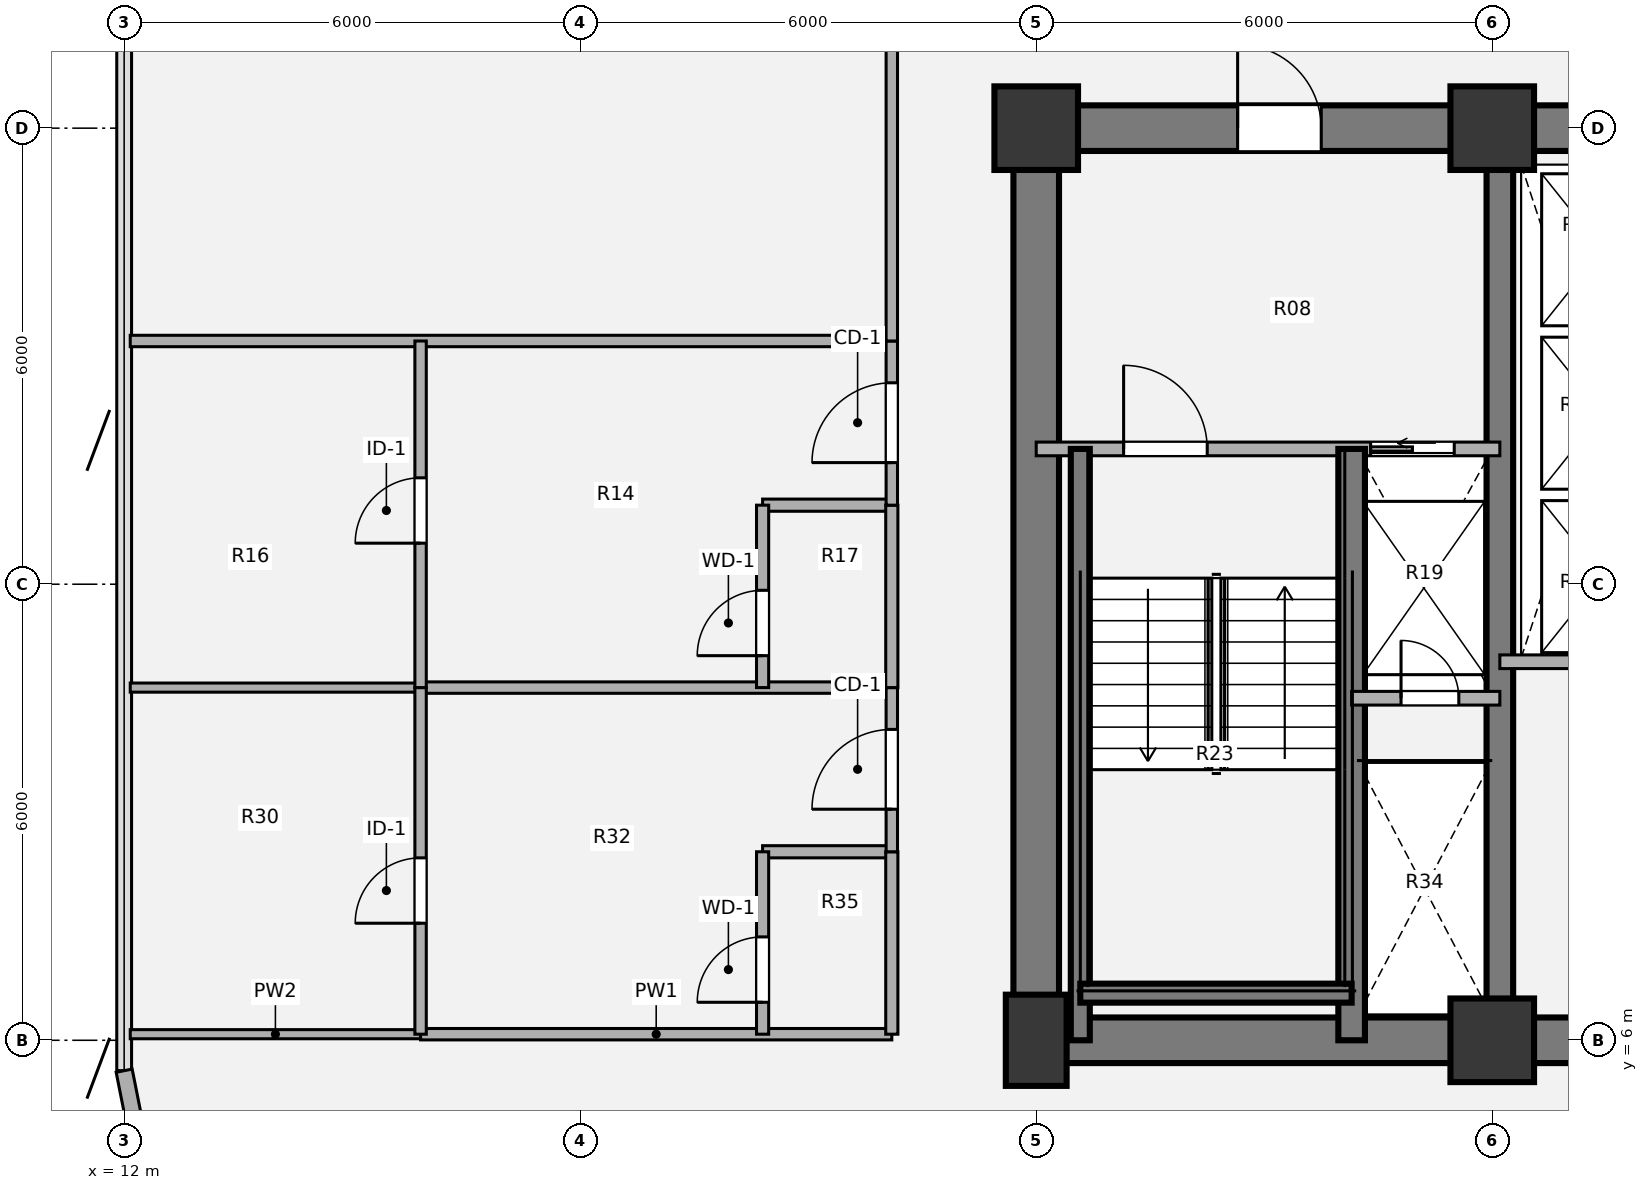
"""IFC4 building model, lengths in metres.
Left out: names, types, materials, properties, quantities, classifications, styles, units other than length and angle.
Written with IfcOpenShell. Run it as: python <this file> out.ifc"""

import sys

from ifc_helpers import new_model, si_unit, direction, frame, frame_2d, origin, origin_2d, place, context, subcontext, project, spatial, rectangle, extrude, source, transform, mapped, element, fill, save


model = new_model("IFC4")
c1 = context("Model", 3, precision=1e-05, world=origin(), true_north=direction((0.0, 1.0)))
c2 = subcontext(c1, "Body", "Model", "MODEL_VIEW")
j1 = project(units=[si_unit("LENGTHUNIT", "METRE"), si_unit("PLANEANGLEUNIT", "RADIAN")], contexts=[c1])
p1 = place(None, origin())
s1 = spatial("IfcSite", under=j1, at=p1, CompositionType="ELEMENT")
p2 = place(p1, origin())
s2 = spatial("IfcBuilding", under=s1, at=p2, CompositionType="ELEMENT")
p3 = place(p2, frame((0.0, 0.0, 49.68)))
s3 = spatial("IfcBuildingStorey", under=s2, at=p3, CompositionType="ELEMENT", Elevation=49.68)
m1 = source(origin(), c2, "Body", "SweptSolid", [
    extrude(rectangle(XDim=0.8, YDim=1.2, at=origin_2d()), origin(), (0.0, 0.0, 1.0), 3.78),
])
p4 = place(p3, frame((24.0, 6.0, 0.0), z_axis=(0.0, 0.0, 1.0), x_axis=(1.0, 0.0, 0.0)))
e1 = element("IfcColumn", 1, at=p4, inside=s3, PredefinedType="COLUMN", context=c2, shape_type="MappedRepresentation", body=[
    mapped(m1, transform((0.0, 0.0, 0.0), x_axis=(1.0, 0.0, 0.0), y_axis=(0.0, 1.0, 0.0), z_axis=(0.0, 0.0, 1.0), scale=1.0)),
])
m2 = source(origin(), c2, "Body", "SweptSolid", [
    extrude(rectangle(XDim=1.1, YDim=1.1, at=origin_2d()), origin(), (0.0, 0.0, 1.0), 3.78),
])
for number, where, z_axis, x_axis in (
    (2, (30.0, 6.0, 0.0), (0.0, 0.0, 1.0), (1.0, 0.0, 0.0)),
    (3, (24.0, 18.0, 0.0), (0.0, 0.0, 1.0), (1.0, 0.0, 0.0)),
    (4, (30.0, 18.0, 0.0), (0.0, 0.0, 1.0), (1.0, 0.0, 0.0)),
):
    element("IfcColumn", number, at=place(p3, frame(where, z_axis=z_axis, x_axis=x_axis)), inside=s3, PredefinedType="COLUMN", context=c2, shape_type="MappedRepresentation", body=[
        mapped(m2, transform((0.0, 0.0, 0.0), x_axis=(1.0, 0.0, 0.0), y_axis=(0.0, 1.0, 0.0), z_axis=(0.0, 0.0, 1.0), scale=1.0)),
    ])
p5 = place(p3, frame((48.3, 6.0, 0.0), z_axis=(0.0, 0.0, 1.0), x_axis=(-1.0, 0.0, 0.0)))
e5 = element("IfcWall", 5, at=p5, inside=s3, PredefinedType="SHEAR", context=c2, shape_type="SweptSolid", body=[
    extrude(rectangle(XDim=24.6, YDim=0.6, at=frame_2d((12.3, 0.0))), origin(), (0.0, 0.0, 1.0), 3.78),
])
p6 = place(p3, frame((24.0, 6.0, 0.0), z_axis=(0.0, 0.0, 1.0), x_axis=(0.0, 1.0, 0.0)))
e6 = element("IfcWall", 6, at=p6, inside=s3, PredefinedType="SHEAR", context=c2, shape_type="SweptSolid", body=[
    extrude(rectangle(XDim=12.0, YDim=0.6, at=frame_2d((6.0, 0.0))), origin(), (0.0, 0.0, 1.0), 3.78),
])
p7 = place(p3, frame((23.7, 18.0, 0.0), z_axis=(0.0, 0.0, 1.0), x_axis=(1.0, 0.0, 0.0)))
e7 = element("IfcWall", 7, at=p7, inside=s3, PredefinedType="SHEAR", context=c2, shape_type="SweptSolid", body=[
    extrude(rectangle(XDim=9.5, YDim=0.6, at=frame_2d((4.75, 0.0))), origin(), (0.0, 0.0, 1.0), 3.78),
])
p8 = place(p7, frame((2.95, 0.0, 0.0)))
e8 = element("IfcOpeningElement", 8, at=p8, cuts=e7, PredefinedType="OPENING", context=c2, shape_type="SweptSolid", body=[
    extrude(rectangle(XDim=1.1, YDim=2.1, at=origin_2d()), frame((0.55, 0.31, 1.05), z_axis=(0.0, -1.0, 0.0), x_axis=(1.0, 0.0, 0.0)), (0.0, 0.0, 1.0), 0.62),
])
p9 = place(p3, frame((30.1, 6.0, 0.0), z_axis=(0.0, 0.0, 1.0), x_axis=(0.0, 1.0, 0.0)))
e9 = element("IfcWall", 9, at=p9, inside=s3, PredefinedType="SHEAR", context=c2, shape_type="SweptSolid", body=[
    extrude(rectangle(XDim=12.0, YDim=0.35, at=frame_2d((6.0, 0.0))), origin(), (0.0, 0.0, 1.0), 3.78),
])
p10 = place(p3, frame((12.244, 4.375, 0.0), z_axis=(0.0, 0.0, 1.0), x_axis=(-0.195138390419, 0.980775717779, 0.0)))
e10 = element("IfcWall", 10, at=p10, inside=s3, PredefinedType="SOLIDWALL", context=c2, shape_type="SweptSolid", body=[
    extrude(rectangle(XDim=1.249, YDim=0.215, at=frame_2d((0.624, 0.0))), origin(), (0.0, 0.0, 1.0), 3.53),
])
p11 = place(p3, frame((30.1, 10.98, 0.0), z_axis=(0.0, 0.0, 1.0), x_axis=(1.0, 0.0, 0.0)))
e11 = element("IfcWall", 11, at=p11, inside=s3, PredefinedType="PARTITIONING", context=c2, shape_type="SweptSolid", body=[
    extrude(rectangle(XDim=4.08, YDim=0.18, at=frame_2d((2.04, 0.0))), origin(), (0.0, 0.0, 1.0), 3.5),
])
p12 = place(p3, frame((24.0, 13.78, 0.0), z_axis=(0.0, 0.0, 1.0), x_axis=(1.0, 0.0, 0.0)))
e12 = element("IfcWall", 12, at=p12, inside=s3, PredefinedType="PARTITIONING", context=c2, shape_type="SweptSolid", body=[
    extrude(rectangle(XDim=6.1, YDim=0.18, at=frame_2d((3.05, 0.0))), origin(), (0.0, 0.0, 1.0), 3.5),
])
p13 = place(p12, frame((1.15, 0.0, 0.0)))
e13 = element("IfcOpeningElement", 13, at=p13, cuts=e12, PredefinedType="OPENING", context=c2, shape_type="SweptSolid", body=[
    extrude(rectangle(XDim=1.1, YDim=2.1, at=origin_2d()), frame((0.55, 0.1, 1.05), z_axis=(0.0, -1.0, 0.0), x_axis=(1.0, 0.0, 0.0)), (0.0, 0.0, 1.0), 0.2),
])
p14 = place(p12, frame((4.4, 0.0, 0.0)))
e14 = element("IfcOpeningElement", 14, at=p14, cuts=e12, PredefinedType="OPENING", context=c2, shape_type="SweptSolid", body=[
    extrude(rectangle(XDim=1.1, YDim=2.1, at=origin_2d()), frame((0.55, 0.1, 1.05), z_axis=(0.0, -1.0, 0.0), x_axis=(1.0, 0.0, 0.0)), (0.0, 0.0, 1.0), 0.2),
])
p15 = place(p3, frame((28.15, 6.0, 0.0), z_axis=(0.0, 0.0, 1.0), x_axis=(0.0, 1.0, 0.0)))
e15 = element("IfcWall", 15, at=p15, inside=s3, PredefinedType="SHEAR", context=c2, shape_type="SweptSolid", body=[
    extrude(rectangle(XDim=7.78, YDim=0.35, at=frame_2d((3.89, 0.0))), origin(), (0.0, 0.0, 1.0), 3.85),
])
p16 = place(p3, frame((24.58, 6.0, 0.0), z_axis=(0.0, 0.0, 1.0), x_axis=(0.0, 1.0, 0.0)))
e16 = element("IfcWall", 16, at=p16, inside=s3, PredefinedType="SHEAR", context=c2, shape_type="SweptSolid", body=[
    extrude(rectangle(XDim=7.78, YDim=0.25, at=frame_2d((3.89, 0.0))), origin(), (0.0, 0.0, 1.0), 3.85),
])
p17 = place(p3, frame((24.58, 6.62, 0.0), z_axis=(0.0, 0.0, 1.0), x_axis=(1.0, 0.0, 0.0)))
e17 = element("IfcWall", 17, at=p17, inside=s3, PredefinedType="SHEAR", context=c2, shape_type="SweptSolid", body=[
    extrude(rectangle(XDim=3.57, YDim=0.25, at=frame_2d((1.785, 0.0))), origin(), (0.0, 0.0, 1.0), 3.85),
])
p18 = place(p3, frame((28.15, 10.5, 0.0), z_axis=(0.0, 0.0, 1.0), x_axis=(1.0, 0.0, 0.0)))
e18 = element("IfcWall", 18, at=p18, inside=s3, PredefinedType="PARTITIONING", context=c2, shape_type="SweptSolid", body=[
    extrude(rectangle(XDim=1.95, YDim=0.18, at=frame_2d((0.975, 0.0))), origin(), (0.0, 0.0, 1.0), 3.5),
])
p19 = place(p18, frame((0.65, 0.0, 0.0)))
e19 = element("IfcOpeningElement", 19, at=p19, cuts=e18, PredefinedType="OPENING", context=c2, shape_type="SweptSolid", body=[
    extrude(rectangle(XDim=0.76, YDim=2.05, at=origin_2d()), frame((0.38, 0.1, 1.025), z_axis=(0.0, -1.0, 0.0), x_axis=(1.0, 0.0, 0.0)), (0.0, 0.0, 1.0), 0.2),
])
p20 = place(p3, frame((12.08, 6.08, 0.0), z_axis=(0.0, 0.0, 1.0), x_axis=(1.0, 0.0, 0.0)))
e20 = element("IfcWall", 20, at=p20, inside=s3, PredefinedType="PARTITIONING", context=c2, shape_type="SweptSolid", body=[
    extrude(rectangle(XDim=3.82, YDim=0.12, at=frame_2d((1.91, 0.0))), origin(), (0.0, 0.0, 1.0), 3.5),
])
p21 = place(p3, frame((15.9, 6.08, 0.0), z_axis=(0.0, 0.0, 1.0), x_axis=(1.0, 0.0, 0.0)))
e21 = element("IfcWall", 21, at=p21, inside=s3, PredefinedType="PARTITIONING", context=c2, shape_type="SweptSolid", body=[
    extrude(rectangle(XDim=6.2, YDim=0.15, at=frame_2d((3.1, 0.0))), origin(), (0.0, 0.0, 1.0), 3.5),
])
p22 = place(p3, frame((20.4, 8.48, 0.0), z_axis=(0.0, 0.0, 1.0), x_axis=(1.0, 0.0, 0.0)))
e22 = element("IfcWall", 22, at=p22, inside=s3, PredefinedType="PLUMBINGWALL", context=c2, shape_type="SweptSolid", body=[
    extrude(rectangle(XDim=1.7, YDim=0.16, at=frame_2d((0.85, 0.0))), origin(), (0.0, 0.0, 1.0), 3.5),
])
p23 = place(p3, frame((12.08, 10.64, 0.0), z_axis=(0.0, 0.0, 1.0), x_axis=(1.0, 0.0, 0.0)))
e23 = element("IfcWall", 23, at=p23, inside=s3, PredefinedType="PARTITIONING", context=c2, shape_type="SweptSolid", body=[
    extrude(rectangle(XDim=3.82, YDim=0.12, at=frame_2d((1.91, 0.0))), origin(), (0.0, 0.0, 1.0), 3.5),
])
p24 = place(p3, frame((15.9, 10.64, 0.0), z_axis=(0.0, 0.0, 1.0), x_axis=(1.0, 0.0, 0.0)))
e24 = element("IfcWall", 24, at=p24, inside=s3, PredefinedType="PARTITIONING", context=c2, shape_type="SweptSolid", body=[
    extrude(rectangle(XDim=6.2, YDim=0.15, at=frame_2d((3.1, 0.0))), origin(), (0.0, 0.0, 1.0), 3.5),
])
p25 = place(p3, frame((20.4, 13.04, 0.0), z_axis=(0.0, 0.0, 1.0), x_axis=(1.0, 0.0, 0.0)))
e25 = element("IfcWall", 25, at=p25, inside=s3, PredefinedType="PLUMBINGWALL", context=c2, shape_type="SweptSolid", body=[
    extrude(rectangle(XDim=1.7, YDim=0.16, at=frame_2d((0.85, 0.0))), origin(), (0.0, 0.0, 1.0), 3.5),
])
p26 = place(p3, frame((12.08, 15.2, 0.0), z_axis=(0.0, 0.0, 1.0), x_axis=(1.0, 0.0, 0.0)))
e26 = element("IfcWall", 26, at=p26, inside=s3, PredefinedType="PARTITIONING", context=c2, shape_type="SweptSolid", body=[
    extrude(rectangle(XDim=10.02, YDim=0.15, at=frame_2d((5.01, 0.0))), origin(), (0.0, 0.0, 1.0), 3.5),
])
p27 = place(p3, frame((15.9, 6.08, 0.0), z_axis=(0.0, 0.0, 1.0), x_axis=(0.0, 1.0, 0.0)))
e27 = element("IfcWall", 27, at=p27, inside=s3, PredefinedType="PARTITIONING", context=c2, shape_type="SweptSolid", body=[
    extrude(rectangle(XDim=4.56, YDim=0.15, at=frame_2d((2.28, 0.0))), origin(), (0.0, 0.0, 1.0), 3.5),
])
p28 = place(p27, frame((1.46, 0.0, 0.0)))
e28 = element("IfcOpeningElement", 28, at=p28, cuts=e27, PredefinedType="OPENING", context=c2, shape_type="SweptSolid", body=[
    extrude(rectangle(XDim=0.86, YDim=2.1, at=origin_2d()), frame((0.43, 0.085, 1.05), z_axis=(0.0, -1.0, 0.0), x_axis=(1.0, 0.0, 0.0)), (0.0, 0.0, 1.0), 0.17),
])
p29 = place(p3, frame((15.9, 10.64, 0.0), z_axis=(0.0, 0.0, 1.0), x_axis=(0.0, 1.0, 0.0)))
e29 = element("IfcWall", 29, at=p29, inside=s3, PredefinedType="PARTITIONING", context=c2, shape_type="SweptSolid", body=[
    extrude(rectangle(XDim=4.56, YDim=0.15, at=frame_2d((2.28, 0.0))), origin(), (0.0, 0.0, 1.0), 3.5),
])
p30 = place(p29, frame((1.9, 0.0, 0.0)))
e30 = element("IfcOpeningElement", 30, at=p30, cuts=e29, PredefinedType="OPENING", context=c2, shape_type="SweptSolid", body=[
    extrude(rectangle(XDim=0.86, YDim=2.1, at=origin_2d()), frame((0.43, 0.085, 1.05), z_axis=(0.0, -1.0, 0.0), x_axis=(1.0, 0.0, 0.0)), (0.0, 0.0, 1.0), 0.17),
])
p31 = place(p3, frame((20.4, 6.08, 0.0), z_axis=(0.0, 0.0, 1.0), x_axis=(0.0, 1.0, 0.0)))
e31 = element("IfcWall", 31, at=p31, inside=s3, PredefinedType="PLUMBINGWALL", context=c2, shape_type="SweptSolid", body=[
    extrude(rectangle(XDim=2.4, YDim=0.16, at=frame_2d((1.2, 0.0))), origin(), (0.0, 0.0, 1.0), 3.5),
])
p32 = place(p31, frame((0.42, 0.0, 0.0)))
e32 = element("IfcOpeningElement", 32, at=p32, cuts=e31, PredefinedType="OPENING", context=c2, shape_type="SweptSolid", body=[
    extrude(rectangle(XDim=0.86, YDim=2.1, at=origin_2d()), frame((0.43, 0.09, 1.05), z_axis=(0.0, -1.0, 0.0), x_axis=(1.0, 0.0, 0.0)), (0.0, 0.0, 1.0), 0.18),
])
p33 = place(p3, frame((20.4, 10.64, 0.0), z_axis=(0.0, 0.0, 1.0), x_axis=(0.0, 1.0, 0.0)))
e33 = element("IfcWall", 33, at=p33, inside=s3, PredefinedType="PLUMBINGWALL", context=c2, shape_type="SweptSolid", body=[
    extrude(rectangle(XDim=2.4, YDim=0.16, at=frame_2d((1.2, 0.0))), origin(), (0.0, 0.0, 1.0), 3.5),
])
p34 = place(p33, frame((0.42, 0.0, 0.0)))
e34 = element("IfcOpeningElement", 34, at=p34, cuts=e33, PredefinedType="OPENING", context=c2, shape_type="SweptSolid", body=[
    extrude(rectangle(XDim=0.86, YDim=2.1, at=origin_2d()), frame((0.43, 0.09, 1.05), z_axis=(0.0, -1.0, 0.0), x_axis=(1.0, 0.0, 0.0)), (0.0, 0.0, 1.0), 0.18),
])
p35 = place(p3, frame((22.1, 6.08, 0.0), z_axis=(0.0, 0.0, 1.0), x_axis=(0.0, 1.0, 0.0)))
e35 = element("IfcWall", 35, at=p35, inside=s3, PredefinedType="PLUMBINGWALL", context=c2, shape_type="SweptSolid", body=[
    extrude(rectangle(XDim=2.4, YDim=0.16, at=frame_2d((1.2, 0.0))), origin(), (0.0, 0.0, 1.0), 3.5),
])
p36 = place(p3, frame((22.1, 8.48, 0.0), z_axis=(0.0, 0.0, 1.0), x_axis=(0.0, 1.0, 0.0)))
e36 = element("IfcWall", 36, at=p36, inside=s3, PredefinedType="PARTITIONING", context=c2, shape_type="SweptSolid", body=[
    extrude(rectangle(XDim=2.16, YDim=0.15, at=frame_2d((1.08, 0.0))), origin(), (0.0, 0.0, 1.0), 3.5),
])
p37 = place(p36, frame((0.56, 0.0, 0.0)))
e37 = element("IfcOpeningElement", 37, at=p37, cuts=e36, PredefinedType="OPENING", context=c2, shape_type="SweptSolid", body=[
    extrude(rectangle(XDim=1.05, YDim=2.1, at=origin_2d()), frame((0.525, 0.085, 1.05), z_axis=(0.0, -1.0, 0.0), x_axis=(1.0, 0.0, 0.0)), (0.0, 0.0, 1.0), 0.17),
])
p38 = place(p3, frame((22.1, 10.64, 0.0), z_axis=(0.0, 0.0, 1.0), x_axis=(0.0, 1.0, 0.0)))
e38 = element("IfcWall", 38, at=p38, inside=s3, PredefinedType="PLUMBINGWALL", context=c2, shape_type="SweptSolid", body=[
    extrude(rectangle(XDim=2.4, YDim=0.16, at=frame_2d((1.2, 0.0))), origin(), (0.0, 0.0, 1.0), 3.5),
])
p39 = place(p3, frame((22.1, 13.04, 0.0), z_axis=(0.0, 0.0, 1.0), x_axis=(0.0, 1.0, 0.0)))
e39 = element("IfcWall", 39, at=p39, inside=s3, PredefinedType="PARTITIONING", context=c2, shape_type="SweptSolid", body=[
    extrude(rectangle(XDim=2.16, YDim=0.15, at=frame_2d((1.08, 0.0))), origin(), (0.0, 0.0, 1.0), 3.5),
])
p40 = place(p39, frame((0.56, 0.0, 0.0)))
e40 = element("IfcOpeningElement", 40, at=p40, cuts=e39, PredefinedType="OPENING", context=c2, shape_type="SweptSolid", body=[
    extrude(rectangle(XDim=1.05, YDim=2.1, at=origin_2d()), frame((0.525, 0.085, 1.05), z_axis=(0.0, -1.0, 0.0), x_axis=(1.0, 0.0, 0.0)), (0.0, 0.0, 1.0), 0.17),
])
p41 = place(p3, frame((22.1, 15.2, 0.0), z_axis=(0.0, 0.0, 1.0), x_axis=(0.0, 1.0, 0.0)))
e41 = element("IfcWall", 41, at=p41, inside=s3, PredefinedType="PARTITIONING", context=c2, shape_type="SweptSolid", body=[
    extrude(rectangle(XDim=9.8, YDim=0.15, at=frame_2d((4.9, 0.0))), origin(), (0.0, 0.0, 1.0), 3.5),
])
p42 = place(p41, frame((4.375, 0.0, 0.0)))
e42 = element("IfcOpeningElement", 42, at=p42, cuts=e41, PredefinedType="OPENING", context=c2, shape_type="SweptSolid", body=[
    extrude(rectangle(XDim=1.05, YDim=2.1, at=origin_2d()), frame((0.525, 0.085, 1.05), z_axis=(0.0, -1.0, 0.0), x_axis=(1.0, 0.0, 0.0)), (0.0, 0.0, 1.0), 0.17),
])
m3 = source(origin(), c2, "Body", "SweptSolid", [
    extrude(rectangle(XDim=1.1, YDim=2.1, at=origin_2d()), frame((0.55, 0.025, 1.05), z_axis=(0.0, -1.0, 0.0), x_axis=(1.0, 0.0, 0.0)), (0.0, 0.0, 1.0), 0.05),
])
p43 = place(p13, origin())
e43 = element("IfcDoor", 43, at=p43, inside=s3, OperationType="SINGLE_SWING_LEFT", PredefinedType="DOOR", context=c2, shape_type="MappedRepresentation", body=[
    mapped(m3, transform((0.0, 0.0, 0.0), x_axis=(1.0, 0.0, 0.0), y_axis=(0.0, 1.0, 0.0), z_axis=(0.0, 0.0, 1.0), scale=1.0)),
])
fill(e13, e43)
m4 = source(origin(), c2, "Body", "SweptSolid", [
    extrude(rectangle(XDim=1.1, YDim=2.1, at=origin_2d()), frame((0.55, 0.025, 1.05), z_axis=(0.0, -1.0, 0.0), x_axis=(1.0, 0.0, 0.0)), (0.0, 0.0, 1.0), 0.05),
])
p44 = place(p14, origin())
e44 = element("IfcDoor", 44, at=p44, inside=s3, OperationType="SLIDING_TO_LEFT", PredefinedType="DOOR", context=c2, shape_type="MappedRepresentation", body=[
    mapped(m4, transform((0.0, 0.0, 0.0), x_axis=(1.0, 0.0, 0.0), y_axis=(0.0, 1.0, 0.0), z_axis=(0.0, 0.0, 1.0), scale=1.0)),
])
fill(e14, e44)
m5 = source(origin(), c2, "Body", "SweptSolid", [
    extrude(rectangle(XDim=0.76, YDim=2.05, at=origin_2d()), frame((0.38, 0.025, 1.025), z_axis=(0.0, -1.0, 0.0), x_axis=(1.0, 0.0, 0.0)), (0.0, 0.0, 1.0), 0.05),
])
p45 = place(p19, origin())
e45 = element("IfcDoor", 45, at=p45, inside=s3, OperationType="SINGLE_SWING_LEFT", PredefinedType="DOOR", context=c2, shape_type="MappedRepresentation", body=[
    mapped(m5, transform((0.0, 0.0, 0.0), x_axis=(1.0, 0.0, 0.0), y_axis=(0.0, 1.0, 0.0), z_axis=(0.0, 0.0, 1.0), scale=1.0)),
])
fill(e19, e45)
m6 = source(origin(), c2, "Body", "SweptSolid", [
    extrude(rectangle(XDim=1.1, YDim=2.1, at=origin_2d()), frame((0.55, 0.025, 1.05), z_axis=(0.0, -1.0, 0.0), x_axis=(1.0, 0.0, 0.0)), (0.0, 0.0, 1.0), 0.05),
])
p46 = place(p8, origin())
e46 = element("IfcDoor", 46, at=p46, inside=s3, OperationType="SINGLE_SWING_LEFT", PredefinedType="DOOR", context=c2, shape_type="MappedRepresentation", body=[
    mapped(m6, transform((0.0, 0.0, 0.0), x_axis=(1.0, 0.0, 0.0), y_axis=(0.0, 1.0, 0.0), z_axis=(0.0, 0.0, 1.0), scale=1.0)),
])
fill(e8, e46)
m7 = source(origin(), c2, "Body", "SweptSolid", [
    extrude(rectangle(XDim=0.86, YDim=2.1, at=origin_2d()), frame((0.43, 0.025, 1.05), z_axis=(0.0, -1.0, 0.0), x_axis=(1.0, 0.0, 0.0)), (0.0, 0.0, 1.0), 0.05),
])
p47 = place(p28, origin())
e47 = element("IfcDoor", 47, at=p47, inside=s3, OperationType="SINGLE_SWING_LEFT", PredefinedType="DOOR", context=c2, shape_type="MappedRepresentation", body=[
    mapped(m7, transform((0.0, 0.0, 0.0), x_axis=(1.0, 0.0, 0.0), y_axis=(0.0, 1.0, 0.0), z_axis=(0.0, 0.0, 1.0), scale=1.0)),
])
fill(e28, e47)
p48 = place(p30, origin())
e48 = element("IfcDoor", 48, at=p48, inside=s3, OperationType="SINGLE_SWING_LEFT", PredefinedType="DOOR", context=c2, shape_type="MappedRepresentation", body=[
    mapped(m7, transform((0.0, 0.0, 0.0), x_axis=(1.0, 0.0, 0.0), y_axis=(0.0, 1.0, 0.0), z_axis=(0.0, 0.0, 1.0), scale=1.0)),
])
fill(e30, e48)
m8 = source(origin(), c2, "Body", "SweptSolid", [
    extrude(rectangle(XDim=0.86, YDim=2.1, at=origin_2d()), frame((0.43, 0.025, 1.05), z_axis=(0.0, -1.0, 0.0), x_axis=(1.0, 0.0, 0.0)), (0.0, 0.0, 1.0), 0.05),
])
p49 = place(p32, origin())
e49 = element("IfcDoor", 49, at=p49, inside=s3, OperationType="SINGLE_SWING_LEFT", PredefinedType="DOOR", context=c2, shape_type="MappedRepresentation", body=[
    mapped(m8, transform((0.0, 0.0, 0.0), x_axis=(1.0, 0.0, 0.0), y_axis=(0.0, 1.0, 0.0), z_axis=(0.0, 0.0, 1.0), scale=1.0)),
])
fill(e32, e49)
p50 = place(p34, origin())
e50 = element("IfcDoor", 50, at=p50, inside=s3, OperationType="SINGLE_SWING_LEFT", PredefinedType="DOOR", context=c2, shape_type="MappedRepresentation", body=[
    mapped(m8, transform((0.0, 0.0, 0.0), x_axis=(1.0, 0.0, 0.0), y_axis=(0.0, 1.0, 0.0), z_axis=(0.0, 0.0, 1.0), scale=1.0)),
])
fill(e34, e50)
m9 = source(origin(), c2, "Body", "SweptSolid", [
    extrude(rectangle(XDim=1.05, YDim=2.1, at=origin_2d()), frame((0.525, 0.025, 1.05), z_axis=(0.0, -1.0, 0.0), x_axis=(1.0, 0.0, 0.0)), (0.0, 0.0, 1.0), 0.05),
])
p51 = place(p37, origin())
e51 = element("IfcDoor", 51, at=p51, inside=s3, OperationType="SINGLE_SWING_LEFT", PredefinedType="DOOR", context=c2, shape_type="MappedRepresentation", body=[
    mapped(m9, transform((0.0, 0.0, 0.0), x_axis=(1.0, 0.0, 0.0), y_axis=(0.0, 1.0, 0.0), z_axis=(0.0, 0.0, 1.0), scale=1.0)),
])
fill(e37, e51)
p52 = place(p40, origin())
e52 = element("IfcDoor", 52, at=p52, inside=s3, OperationType="SINGLE_SWING_LEFT", PredefinedType="DOOR", context=c2, shape_type="MappedRepresentation", body=[
    mapped(m9, transform((0.0, 0.0, 0.0), x_axis=(1.0, 0.0, 0.0), y_axis=(0.0, 1.0, 0.0), z_axis=(0.0, 0.0, 1.0), scale=1.0)),
])
fill(e40, e52)
save(model, sys.argv[1])
